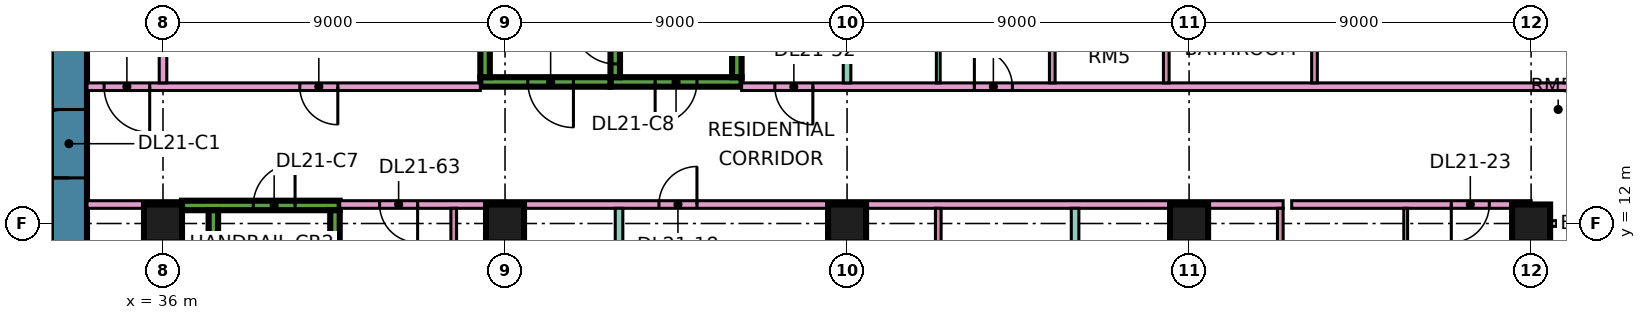
"""IFC4 building model, lengths in metres.
Left out: names, types, materials, properties, quantities, classifications, styles, units other than length and angle.
Written with IfcOpenShell. Run it as: python <this file> out.ifc"""

import sys

from ifc_helpers import new_model, si_unit, direction, frame, frame_2d, origin, origin_2d, place, context, subcontext, project, spatial, rectangle, extrude, element, fill, save


model = new_model("IFC4")
c1 = context("Model", 3, precision=1e-05, world=origin(), true_north=direction((0.0, 1.0)))
c2 = subcontext(c1, "Body", "Model", "MODEL_VIEW")
j1 = project(units=[si_unit("LENGTHUNIT", "METRE"), si_unit("PLANEANGLEUNIT", "RADIAN")], contexts=[c1])
p1 = place(None, origin())
s1 = spatial("IfcSite", under=j1, at=p1, CompositionType="ELEMENT")
p2 = place(p1, origin())
s2 = spatial("IfcBuilding", under=s1, at=p2, CompositionType="ELEMENT")
p3 = place(p2, frame((0.0, 0.0, 95.65)))
s3 = spatial("IfcBuildingStorey", under=s2, at=p3, CompositionType="ELEMENT", Elevation=95.65)
for number, where, z_axis, x_axis in (
    (1, (36.0, 12.0, 0.0), (0.0, 0.0, 1.0), (1.0, 0.0, 0.0)),
    (2, (45.0, 12.0, 0.0), (0.0, 0.0, 1.0), (1.0, 0.0, 0.0)),
    (3, (54.0, 12.0, 0.0), (0.0, 0.0, 1.0), (1.0, 0.0, 0.0)),
    (4, (63.0, 12.0, 0.0), (0.0, 0.0, 1.0), (1.0, 0.0, 0.0)),
    (5, (72.0, 12.0, 0.0), (0.0, 0.0, 1.0), (1.0, 0.0, 0.0)),
):
    element("IfcColumn", number, at=place(p3, frame(where, z_axis=z_axis, x_axis=x_axis)), inside=s3, PredefinedType="COLUMN", context=c2, shape_type="SweptSolid", body=[
        extrude(rectangle(XDim=1.0, YDim=1.0, at=origin_2d()), origin(), (0.0, 0.0, 1.0), 3.75),
    ])
p4 = place(p3, frame((33.525, 7.95, 0.0), z_axis=(0.0, 0.0, 1.0), x_axis=(0.0, 1.0, 0.0)))
e6 = element("IfcWall", 6, at=p4, inside=s3, PredefinedType="SHEAR", context=c2, shape_type="SweptSolid", body=[
    extrude(rectangle(XDim=11.1, YDim=0.95, at=frame_2d((5.55, 0.0))), origin(), (0.0, 0.0, 1.0), 3.75),
])
p5 = place(p4, frame((5.25, 0.0, 0.0)))
e7 = element("IfcOpeningElement", 7, at=p5, cuts=e6, PredefinedType="OPENING", context=c2, shape_type="SweptSolid", body=[
    extrude(rectangle(XDim=1.8, YDim=2.4, at=frame_2d((0.9, 1.2))), frame((0.0, 0.485, 0.0), z_axis=(0.0, -1.0, 0.0), x_axis=(1.0, 0.0, 0.0)), (0.0, 0.0, 1.0), 0.97),
])
p6 = place(p3, frame((36.5, 12.475, 0.0), z_axis=(0.0, 0.0, 1.0), x_axis=(1.0, 0.0, 0.0)))
e8 = element("IfcWall", 8, at=p6, inside=s3, PredefinedType="SHEAR", context=c2, shape_type="SweptSolid", body=[
    extrude(rectangle(XDim=4.15, YDim=0.25, at=frame_2d((2.075, 0.0))), origin(), (0.0, 0.0, 1.0), 3.75),
])
p7 = place(p6, frame((1.875, 0.0, 0.0)))
e9 = element("IfcOpeningElement", 9, at=p7, cuts=e8, PredefinedType="OPENING", context=c2, shape_type="SweptSolid", body=[
    extrude(rectangle(XDim=1.1, YDim=2.2, at=frame_2d((0.55, 1.1))), frame((0.0, 0.135, 0.0), z_axis=(0.0, -1.0, 0.0), x_axis=(1.0, 0.0, 0.0)), (0.0, 0.0, 1.0), 0.27),
])
for number, where, z_axis, x_axis in (
    (10, (37.325, 5.85, 0.0), (0.0, 0.0, 1.0), (0.0, 1.0, 0.0)),
    (11, (40.525, 5.85, 0.0), (0.0, 0.0, 1.0), (0.0, 1.0, 0.0)),
):
    element("IfcWall", number, at=place(p3, frame(where, z_axis=z_axis, x_axis=x_axis)), inside=s3, PredefinedType="SHEAR", context=c2, shape_type="SweptSolid", body=[
        extrude(rectangle(XDim=6.5, YDim=0.25, at=frame_2d((3.25, 0.0))), origin(), (0.0, 0.0, 1.0), 3.75),
    ])
p8 = place(p3, frame((47.775, 15.725, 0.0), z_axis=(0.0, 0.0, 1.0), x_axis=(1.0, 0.0, 0.0)))
e12 = element("IfcWall", 12, at=p8, inside=s3, PredefinedType="SHEAR", context=c2, shape_type="SweptSolid", body=[
    extrude(rectangle(XDim=3.45, YDim=0.25, at=frame_2d((1.725, 0.0))), origin(), (0.0, 0.0, 1.0), 3.75),
])
p9 = place(p8, frame((1.175, 0.0, 0.0)))
e13 = element("IfcOpeningElement", 13, at=p9, cuts=e12, PredefinedType="OPENING", context=c2, shape_type="SweptSolid", body=[
    extrude(rectangle(XDim=1.1, YDim=2.2, at=frame_2d((0.55, 1.1))), frame((0.0, 0.135, 0.0), z_axis=(0.0, -1.0, 0.0), x_axis=(1.0, 0.0, 0.0)), (0.0, 0.0, 1.0), 0.27),
])
p10 = place(p3, frame((47.9, 15.85, 0.0), z_axis=(0.0, 0.0, 1.0), x_axis=(0.0, 1.0, 0.0)))
e14 = element("IfcWall", 14, at=p10, inside=s3, PredefinedType="SHEAR", context=c2, shape_type="SweptSolid", body=[
    extrude(rectangle(XDim=6.5, YDim=0.25, at=frame_2d((3.25, 0.0))), origin(), (0.0, 0.0, 1.0), 3.75),
])
p11 = place(p10, frame((0.35, 0.0, 0.0)))
e15 = element("IfcOpeningElement", 15, at=p11, cuts=e14, PredefinedType="OPENING", context=c2, shape_type="SweptSolid", body=[
    extrude(rectangle(XDim=1.1, YDim=2.2, at=frame_2d((0.55, 1.1))), frame((0.0, 0.135, 0.0), z_axis=(0.0, -1.0, 0.0), x_axis=(1.0, 0.0, 0.0)), (0.0, 0.0, 1.0), 0.27),
])
p12 = place(p3, frame((51.1, 15.85, 0.0), z_axis=(0.0, 0.0, 1.0), x_axis=(0.0, 1.0, 0.0)))
e16 = element("IfcWall", 16, at=p12, inside=s3, PredefinedType="SHEAR", context=c2, shape_type="SweptSolid", body=[
    extrude(rectangle(XDim=6.5, YDim=0.25, at=frame_2d((3.25, 0.0))), origin(), (0.0, 0.0, 1.0), 3.75),
])
p13 = place(p3, frame((44.35, 15.725, 0.0), z_axis=(0.0, 0.0, 1.0), x_axis=(1.0, 0.0, 0.0)))
e17 = element("IfcWall", 17, at=p13, inside=s3, PredefinedType="SHEAR", context=c2, shape_type="SweptSolid", body=[
    extrude(rectangle(XDim=3.425, YDim=0.25, at=frame_2d((1.712, 0.0))), origin(), (0.0, 0.0, 1.0), 3.75),
])
p14 = place(p13, frame((1.25, 0.0, 0.0)))
e18 = element("IfcOpeningElement", 18, at=p14, cuts=e17, PredefinedType="OPENING", context=c2, shape_type="SweptSolid", body=[
    extrude(rectangle(XDim=1.2, YDim=2.2, at=frame_2d((0.6, 1.1))), frame((0.0, 0.135, 0.0), z_axis=(0.0, -1.0, 0.0), x_axis=(1.0, 0.0, 0.0)), (0.0, 0.0, 1.0), 0.27),
])
p15 = place(p3, frame((44.475, 15.85, 0.0), z_axis=(0.0, 0.0, 1.0), x_axis=(0.0, 1.0, 0.0)))
e19 = element("IfcWall", 19, at=p15, inside=s3, PredefinedType="SHEAR", context=c2, shape_type="SweptSolid", body=[
    extrude(rectangle(XDim=6.5, YDim=0.25, at=frame_2d((3.25, 0.0))), origin(), (0.0, 0.0, 1.0), 3.75),
])
p16 = place(p15, frame((1.75, 0.0, 0.0)))
e20 = element("IfcOpeningElement", 20, at=p16, cuts=e19, PredefinedType="OPENING", context=c2, shape_type="SweptSolid", body=[
    extrude(rectangle(XDim=1.1, YDim=2.2, at=frame_2d((0.55, 1.1))), frame((0.0, 0.135, 0.0), z_axis=(0.0, -1.0, 0.0), x_axis=(1.0, 0.0, 0.0)), (0.0, 0.0, 1.0), 0.27),
])
p17 = place(p15, frame((4.3, 0.0, 0.0)))
e21 = element("IfcOpeningElement", 21, at=p17, cuts=e19, PredefinedType="OPENING", context=c2, shape_type="SweptSolid", body=[
    extrude(rectangle(XDim=1.1, YDim=2.2, at=frame_2d((0.55, 1.1))), frame((0.0, 0.135, 0.0), z_axis=(0.0, -1.0, 0.0), x_axis=(1.0, 0.0, 0.0)), (0.0, 0.0, 1.0), 0.27),
])
p18 = place(p3, frame((72.0, 1.575, 0.0), z_axis=(0.0, 0.0, 1.0), x_axis=(0.0, 1.0, 0.0)))
e22 = element("IfcWall", 22, at=p18, inside=s3, PredefinedType="SOLIDWALL", context=c2, shape_type="SweptSolid", body=[
    extrude(rectangle(XDim=10.35, YDim=0.15, at=frame_2d((5.175, 0.0))), origin(), (0.0, 0.0, 1.0), 3.35),
])
p19 = place(p18, frame((4.012, 0.0, 0.0)))
e23 = element("IfcOpeningElement", 23, at=p19, cuts=e22, PredefinedType="OPENING", context=c2, shape_type="SweptSolid", body=[
    extrude(rectangle(XDim=1.8, YDim=2.4, at=frame_2d((0.9, 1.2))), frame((0.0, 0.085, 0.0), z_axis=(0.0, -1.0, 0.0), x_axis=(1.0, 0.0, 0.0)), (0.0, 0.0, 1.0), 0.17),
])
p20 = place(p3, frame((73.5, 12.0, 0.0), z_axis=(0.0, 0.0, 1.0), x_axis=(-1.0, 0.0, 0.0)))
e24 = element("IfcWall", 24, at=p20, inside=s3, PredefinedType="SOLIDWALL", context=c2, shape_type="SweptSolid", body=[
    extrude(rectangle(XDim=1.5, YDim=0.15, at=frame_2d((0.75, 0.0))), origin(), (0.0, 0.0, 1.0), 3.35),
])
p21 = place(p3, frame((34.0, 12.5, 0.0), z_axis=(0.0, 0.0, 1.0), x_axis=(1.0, 0.0, 0.0)))
e25 = element("IfcWall", 25, at=p21, inside=s3, PredefinedType="PARTITIONING", context=c2, shape_type="SweptSolid", body=[
    extrude(rectangle(XDim=2.501, YDim=0.2, at=frame_2d((1.25, 0.0))), origin(), (0.0, 0.0, 1.0), 3.35),
])
p22 = place(p3, frame((34.0, 15.6, 0.0), z_axis=(0.0, 0.0, 1.0), x_axis=(1.0, 0.0, 0.0)))
e26 = element("IfcWall", 26, at=p22, inside=s3, PredefinedType="PARTITIONING", context=c2, shape_type="SweptSolid", body=[
    extrude(rectangle(XDim=10.35, YDim=0.2, at=frame_2d((5.175, 0.0))), origin(), (0.0, 0.0, 1.0), 3.35),
])
p23 = place(p22, frame((5.6, 0.0, 0.0)))
e27 = element("IfcOpeningElement", 27, at=p23, cuts=e26, PredefinedType="OPENING", context=c2, shape_type="SweptSolid", body=[
    extrude(rectangle(XDim=1.0, YDim=2.1, at=frame_2d((0.5, 1.05))), frame((0.0, 0.11, 0.0), z_axis=(0.0, -1.0, 0.0), x_axis=(1.0, 0.0, 0.0)), (0.0, 0.0, 1.0), 0.22),
])
p24 = place(p22, frame((0.45, 0.0, 0.0)))
e28 = element("IfcOpeningElement", 28, at=p24, cuts=e26, PredefinedType="OPENING", context=c2, shape_type="SweptSolid", body=[
    extrude(rectangle(XDim=1.2, YDim=2.1, at=frame_2d((0.6, 1.05))), frame((0.0, 0.11, 0.0), z_axis=(0.0, -1.0, 0.0), x_axis=(1.0, 0.0, 0.0)), (0.0, 0.0, 1.0), 0.22),
])
p25 = place(p3, frame((36.0, 15.7, 0.0), z_axis=(0.0, 0.0, 1.0), x_axis=(0.0, 1.0, 0.0)))
e29 = element("IfcWall", 29, at=p25, inside=s3, PredefinedType="PARTITIONING", context=c2, shape_type="SweptSolid", body=[
    extrude(rectangle(XDim=8.3, YDim=0.2, at=frame_2d((4.15, 0.0))), origin(), (0.0, 0.0, 1.0), 3.35),
])
p26 = place(p3, frame((40.65, 12.5, 0.0), z_axis=(0.0, 0.0, 1.0), x_axis=(1.0, 0.0, 0.0)))
e30 = element("IfcWall", 30, at=p26, inside=s3, PredefinedType="PARTITIONING", context=c2, shape_type="SweptSolid", body=[
    extrude(rectangle(XDim=24.825, YDim=0.2, at=frame_2d((12.413, 0.0))), origin(), (0.0, 0.0, 1.0), 3.35),
])
p27 = place(p26, frame((8.4, 0.0, 0.0)))
e31 = element("IfcOpeningElement", 31, at=p27, cuts=e30, PredefinedType="OPENING", context=c2, shape_type="SweptSolid", body=[
    extrude(rectangle(XDim=1.0, YDim=2.1, at=frame_2d((0.5, 1.05))), frame((0.0, 0.11, 0.0), z_axis=(0.0, -1.0, 0.0), x_axis=(1.0, 0.0, 0.0)), (0.0, 0.0, 1.0), 0.22),
])
p28 = place(p26, frame((1.05, 0.0, 0.0)))
e32 = element("IfcOpeningElement", 32, at=p28, cuts=e30, PredefinedType="OPENING", context=c2, shape_type="SweptSolid", body=[
    extrude(rectangle(XDim=1.0, YDim=2.1, at=frame_2d((0.5, 1.05))), frame((0.0, 0.11, 0.0), z_axis=(0.0, -1.0, 0.0), x_axis=(1.0, 0.0, 0.0)), (0.0, 0.0, 1.0), 0.22),
])
p29 = place(p3, frame((43.65, 5.825, 0.0), z_axis=(0.0, 0.0, 1.0), x_axis=(0.0, 1.0, 0.0)))
e33 = element("IfcWall", 33, at=p29, inside=s3, PredefinedType="PARTITIONING", context=c2, shape_type="SweptSolid", body=[
    extrude(rectangle(XDim=6.575, YDim=0.15, at=frame_2d((3.288, 0.0))), origin(), (0.0, 0.0, 1.0), 3.35),
])
p30 = place(p29, frame((4.425, 0.0, 0.0)))
e34 = element("IfcOpeningElement", 34, at=p30, cuts=e33, PredefinedType="OPENING", context=c2, shape_type="SweptSolid", body=[
    extrude(rectangle(XDim=0.9, YDim=2.1, at=frame_2d((0.45, 1.05))), frame((0.0, 0.085, 0.0), z_axis=(0.0, -1.0, 0.0), x_axis=(1.0, 0.0, 0.0)), (0.0, 0.0, 1.0), 0.17),
])
p31 = place(p3, frame((48.0, 0.0, 0.0), z_axis=(0.0, 0.0, 1.0), x_axis=(0.0, 1.0, 0.0)))
e35 = element("IfcWall", 35, at=p31, inside=s3, PredefinedType="PARTITIONING", context=c2, shape_type="SweptSolid", body=[
    extrude(rectangle(XDim=12.4, YDim=0.2, at=frame_2d((6.2, 0.0))), origin(), (0.0, 0.0, 1.0), 3.35),
])
p32 = place(p3, frame((51.225, 15.6, 0.0), z_axis=(0.0, 0.0, 1.0), x_axis=(1.0, 0.0, 0.0)))
e36 = element("IfcWall", 36, at=p32, inside=s3, PredefinedType="PARTITIONING", context=c2, shape_type="SweptSolid", body=[
    extrude(rectangle(XDim=22.125, YDim=0.2, at=frame_2d((11.062, 0.0))), origin(), (0.0, 0.0, 1.0), 3.35),
])
p33 = place(p32, frame((6.125, 0.0, 0.0)))
e37 = element("IfcOpeningElement", 37, at=p33, cuts=e36, PredefinedType="OPENING", context=c2, shape_type="SweptSolid", body=[
    extrude(rectangle(XDim=1.0, YDim=2.1, at=frame_2d((0.5, 1.05))), frame((0.0, 0.11, 0.0), z_axis=(0.0, -1.0, 0.0), x_axis=(1.0, 0.0, 0.0)), (0.0, 0.0, 1.0), 0.22),
])
p34 = place(p32, frame((0.875, 0.0, 0.0)))
e38 = element("IfcOpeningElement", 38, at=p34, cuts=e36, PredefinedType="OPENING", context=c2, shape_type="SweptSolid", body=[
    extrude(rectangle(XDim=1.0, YDim=2.1, at=frame_2d((0.5, 1.05))), frame((0.0, 0.11, 0.0), z_axis=(0.0, -1.0, 0.0), x_axis=(1.0, 0.0, 0.0)), (0.0, 0.0, 1.0), 0.22),
])
p35 = place(p3, frame((54.0, 15.7, 0.0), z_axis=(0.0, 0.0, 1.0), x_axis=(0.0, 1.0, 0.0)))
e39 = element("IfcWall", 39, at=p35, inside=s3, PredefinedType="PARTITIONING", context=c2, shape_type="SweptSolid", body=[
    extrude(rectangle(XDim=8.226, YDim=0.2, at=frame_2d((4.113, 0.0))), origin(), (0.0, 0.0, 1.0), 3.35),
])
p36 = place(p3, frame((54.3, 7.775, 0.0), z_axis=(0.0, 0.0, 1.0), x_axis=(0.0, 1.0, 0.0)))
e40 = element("IfcWall", 40, at=p36, inside=s3, PredefinedType="PARTITIONING", context=c2, shape_type="SweptSolid", body=[
    extrude(rectangle(XDim=4.625, YDim=0.15, at=frame_2d((2.312, 0.0))), origin(), (0.0, 0.0, 1.0), 3.35),
])
p37 = place(p36, frame((1.875, 0.0, 0.0)))
e41 = element("IfcOpeningElement", 41, at=p37, cuts=e40, PredefinedType="OPENING", context=c2, shape_type="SweptSolid", body=[
    extrude(rectangle(XDim=0.8, YDim=2.1, at=frame_2d((0.4, 1.05))), frame((0.0, 0.085, 0.0), z_axis=(0.0, -1.0, 0.0), x_axis=(1.0, 0.0, 0.0)), (0.0, 0.0, 1.0), 0.17),
])
p38 = place(p3, frame((56.4, 7.775, 0.0), z_axis=(0.0, 0.0, 1.0), x_axis=(0.0, 1.0, 0.0)))
e42 = element("IfcWall", 42, at=p38, inside=s3, PredefinedType="PARTITIONING", context=c2, shape_type="SweptSolid", body=[
    extrude(rectangle(XDim=4.625, YDim=0.15, at=frame_2d((2.312, 0.0))), origin(), (0.0, 0.0, 1.0), 3.35),
])
p39 = place(p3, frame((56.4, 15.7, 0.0), z_axis=(0.0, 0.0, 1.0), x_axis=(0.0, 1.0, 0.0)))
e43 = element("IfcWall", 43, at=p39, inside=s3, PredefinedType="PARTITIONING", context=c2, shape_type="SweptSolid", body=[
    extrude(rectangle(XDim=2.65, YDim=0.1, at=frame_2d((1.325, 0.0))), origin(), (0.0, 0.0, 1.0), 3.35),
])
p40 = place(p3, frame((59.4, 15.7, 0.0), z_axis=(0.0, 0.0, 1.0), x_axis=(0.0, 1.0, 0.0)))
e44 = element("IfcWall", 44, at=p40, inside=s3, PredefinedType="PARTITIONING", context=c2, shape_type="SweptSolid", body=[
    extrude(rectangle(XDim=2.525, YDim=0.15, at=frame_2d((1.263, 0.0))), origin(), (0.0, 0.0, 1.0), 3.35),
])
p41 = place(p3, frame((60.0, 0.0, 0.0), z_axis=(0.0, 0.0, 1.0), x_axis=(0.0, 1.0, 0.0)))
e45 = element("IfcWall", 45, at=p41, inside=s3, PredefinedType="PARTITIONING", context=c2, shape_type="SweptSolid", body=[
    extrude(rectangle(XDim=12.4, YDim=0.2, at=frame_2d((6.2, 0.0))), origin(), (0.0, 0.0, 1.0), 3.35),
])
p42 = place(p3, frame((62.4, 15.7, 0.0), z_axis=(0.0, 0.0, 1.0), x_axis=(0.0, 1.0, 0.0)))
e46 = element("IfcWall", 46, at=p42, inside=s3, PredefinedType="PARTITIONING", context=c2, shape_type="SweptSolid", body=[
    extrude(rectangle(XDim=2.525, YDim=0.15, at=frame_2d((1.263, 0.0))), origin(), (0.0, 0.0, 1.0), 3.35),
])
for number, where, z_axis, x_axis in (
    (47, (63.3, 7.175, 0.0), (0.0, 0.0, 1.0), (0.0, 1.0, 0.0)),
    (48, (65.4, 7.175, 0.0), (0.0, 0.0, 1.0), (0.0, 1.0, 0.0)),
):
    element("IfcWall", number, at=place(p3, frame(where, z_axis=z_axis, x_axis=x_axis)), inside=s3, PredefinedType="PARTITIONING", context=c2, shape_type="SweptSolid", body=[
        extrude(rectangle(XDim=5.225, YDim=0.15, at=frame_2d((2.612, 0.0))), origin(), (0.0, 0.0, 1.0), 3.35),
    ])
p43 = place(p3, frame((65.7, 12.5, 0.0), z_axis=(0.0, 0.0, 1.0), x_axis=(1.0, 0.0, 0.0)))
e49 = element("IfcWall", 49, at=p43, inside=s3, PredefinedType="PARTITIONING", context=c2, shape_type="SweptSolid", body=[
    extrude(rectangle(XDim=6.3, YDim=0.2, at=frame_2d((3.15, 0.0))), origin(), (0.0, 0.0, 1.0), 3.35),
])
p44 = place(p43, frame((4.2, 0.0, 0.0)))
e50 = element("IfcOpeningElement", 50, at=p44, cuts=e49, PredefinedType="OPENING", context=c2, shape_type="SweptSolid", body=[
    extrude(rectangle(XDim=1.0, YDim=2.1, at=frame_2d((0.5, 1.05))), frame((0.0, 0.11, 0.0), z_axis=(0.0, -1.0, 0.0), x_axis=(1.0, 0.0, 0.0)), (0.0, 0.0, 1.0), 0.22),
])
p45 = place(p3, frame((66.3, 15.7, 0.0), z_axis=(0.0, 0.0, 1.0), x_axis=(0.0, 1.0, 0.0)))
e51 = element("IfcWall", 51, at=p45, inside=s3, PredefinedType="PARTITIONING", context=c2, shape_type="SweptSolid", body=[
    extrude(rectangle(XDim=2.525, YDim=0.15, at=frame_2d((1.263, 0.0))), origin(), (0.0, 0.0, 1.0), 3.35),
])
p46 = place(p3, frame((68.7, 7.05, 0.0), z_axis=(0.0, 0.0, 1.0), x_axis=(0.0, 1.0, 0.0)))
e52 = element("IfcWall", 52, at=p46, inside=s3, PredefinedType="PARTITIONING", context=c2, shape_type="SweptSolid", body=[
    extrude(rectangle(XDim=5.35, YDim=0.1, at=frame_2d((2.675, 0.0))), origin(), (0.0, 0.0, 1.0), 3.35),
])
p47 = place(p5, origin())
e53 = element("IfcDoor", 53, at=p47, inside=s3, OperationType="DOUBLE_DOOR_SINGLE_SWING", PredefinedType="DOOR", context=c2, shape_type="SweptSolid", body=[
    extrude(rectangle(XDim=1.8, YDim=2.4, at=frame_2d((0.9, 1.2))), frame((0.0, 0.025, 0.0), z_axis=(0.0, -1.0, 0.0), x_axis=(1.0, 0.0, 0.0)), (0.0, 0.0, 1.0), 0.05),
])
fill(e7, e53)
p48 = place(p7, frame((1.1, 0.0, 0.0), z_axis=(0.0, 0.0, 1.0), x_axis=(-1.0, 0.0, 0.0)))
e54 = element("IfcDoor", 54, at=p48, inside=s3, OperationType="SINGLE_SWING_RIGHT", PredefinedType="DOOR", context=c2, shape_type="SweptSolid", body=[
    extrude(rectangle(XDim=1.1, YDim=2.2, at=frame_2d((0.55, 1.1))), frame((0.0, 0.025, 0.0), z_axis=(0.0, -1.0, 0.0), x_axis=(1.0, 0.0, 0.0)), (0.0, 0.0, 1.0), 0.05),
])
fill(e9, e54)
p49 = place(p9, frame((1.1, 0.0, 0.0), z_axis=(0.0, 0.0, 1.0), x_axis=(-1.0, 0.0, 0.0)))
e55 = element("IfcDoor", 55, at=p49, inside=s3, OperationType="SINGLE_SWING_LEFT", PredefinedType="DOOR", context=c2, shape_type="SweptSolid", body=[
    extrude(rectangle(XDim=1.1, YDim=2.2, at=frame_2d((0.55, 1.1))), frame((0.0, 0.025, 0.0), z_axis=(0.0, -1.0, 0.0), x_axis=(1.0, 0.0, 0.0)), (0.0, 0.0, 1.0), 0.05),
])
fill(e13, e55)
p50 = place(p14, origin())
e56 = element("IfcDoor", 56, at=p50, inside=s3, OperationType="SINGLE_SWING_RIGHT", PredefinedType="DOOR", context=c2, shape_type="SweptSolid", body=[
    extrude(rectangle(XDim=1.2, YDim=2.2, at=frame_2d((0.6, 1.1))), frame((0.0, 0.025, 0.0), z_axis=(0.0, -1.0, 0.0), x_axis=(1.0, 0.0, 0.0)), (0.0, 0.0, 1.0), 0.05),
])
fill(e18, e56)
p51 = place(p11, frame((1.1, 0.0, 0.0), z_axis=(0.0, 0.0, 1.0), x_axis=(-1.0, 0.0, 0.0)))
e57 = element("IfcDoor", 57, at=p51, inside=s3, OperationType="SINGLE_SWING_RIGHT", PredefinedType="DOOR", context=c2, shape_type="SweptSolid", body=[
    extrude(rectangle(XDim=1.1, YDim=2.2, at=frame_2d((0.55, 1.1))), frame((0.0, 0.025, 0.0), z_axis=(0.0, -1.0, 0.0), x_axis=(1.0, 0.0, 0.0)), (0.0, 0.0, 1.0), 0.05),
])
fill(e15, e57)
p52 = place(p23, origin())
e58 = element("IfcDoor", 58, at=p52, inside=s3, OperationType="SINGLE_SWING_RIGHT", PredefinedType="DOOR", context=c2, shape_type="SweptSolid", body=[
    extrude(rectangle(XDim=1.0, YDim=2.1, at=frame_2d((0.5, 1.05))), frame((0.0, 0.025, 0.0), z_axis=(0.0, -1.0, 0.0), x_axis=(1.0, 0.0, 0.0)), (0.0, 0.0, 1.0), 0.05),
])
fill(e27, e58)
p53 = place(p33, origin())
e59 = element("IfcDoor", 59, at=p53, inside=s3, OperationType="SINGLE_SWING_LEFT", PredefinedType="DOOR", context=c2, shape_type="SweptSolid", body=[
    extrude(rectangle(XDim=1.0, YDim=2.1, at=frame_2d((0.5, 1.05))), frame((0.0, 0.025, 0.0), z_axis=(0.0, -1.0, 0.0), x_axis=(1.0, 0.0, 0.0)), (0.0, 0.0, 1.0), 0.05),
])
fill(e37, e59)
p54 = place(p27, frame((1.0, 0.0, 0.0), z_axis=(0.0, 0.0, 1.0), x_axis=(-1.0, 0.0, 0.0)))
e60 = element("IfcDoor", 60, at=p54, inside=s3, OperationType="SINGLE_SWING_RIGHT", PredefinedType="DOOR", context=c2, shape_type="SweptSolid", body=[
    extrude(rectangle(XDim=1.0, YDim=2.1, at=frame_2d((0.5, 1.05))), frame((0.0, 0.025, 0.0), z_axis=(0.0, -1.0, 0.0), x_axis=(1.0, 0.0, 0.0)), (0.0, 0.0, 1.0), 0.05),
])
fill(e31, e60)
p55 = place(p44, frame((1.0, 0.0, 0.0), z_axis=(0.0, 0.0, 1.0), x_axis=(-1.0, 0.0, 0.0)))
e61 = element("IfcDoor", 61, at=p55, inside=s3, OperationType="SINGLE_SWING_LEFT", PredefinedType="DOOR", context=c2, shape_type="SweptSolid", body=[
    extrude(rectangle(XDim=1.0, YDim=2.1, at=frame_2d((0.5, 1.05))), frame((0.0, 0.025, 0.0), z_axis=(0.0, -1.0, 0.0), x_axis=(1.0, 0.0, 0.0)), (0.0, 0.0, 1.0), 0.05),
])
fill(e50, e61)
p56 = place(p24, origin())
e62 = element("IfcDoor", 62, at=p56, inside=s3, OperationType="SINGLE_SWING_RIGHT", PredefinedType="DOOR", context=c2, shape_type="SweptSolid", body=[
    extrude(rectangle(XDim=1.2, YDim=2.1, at=frame_2d((0.6, 1.05))), frame((0.0, 0.025, 0.0), z_axis=(0.0, -1.0, 0.0), x_axis=(1.0, 0.0, 0.0)), (0.0, 0.0, 1.0), 0.05),
])
fill(e28, e62)
p57 = place(p34, origin())
e63 = element("IfcDoor", 63, at=p57, inside=s3, OperationType="SINGLE_SWING_RIGHT", PredefinedType="DOOR", context=c2, shape_type="SweptSolid", body=[
    extrude(rectangle(XDim=1.0, YDim=2.1, at=frame_2d((0.5, 1.05))), frame((0.0, 0.025, 0.0), z_axis=(0.0, -1.0, 0.0), x_axis=(1.0, 0.0, 0.0)), (0.0, 0.0, 1.0), 0.05),
])
fill(e38, e63)
p58 = place(p28, origin())
e64 = element("IfcDoor", 64, at=p58, inside=s3, OperationType="SINGLE_SWING_RIGHT", PredefinedType="DOOR", context=c2, shape_type="SweptSolid", body=[
    extrude(rectangle(XDim=1.0, YDim=2.1, at=frame_2d((0.5, 1.05))), frame((0.0, 0.025, 0.0), z_axis=(0.0, -1.0, 0.0), x_axis=(1.0, 0.0, 0.0)), (0.0, 0.0, 1.0), 0.05),
])
fill(e32, e64)
save(model, sys.argv[1])
